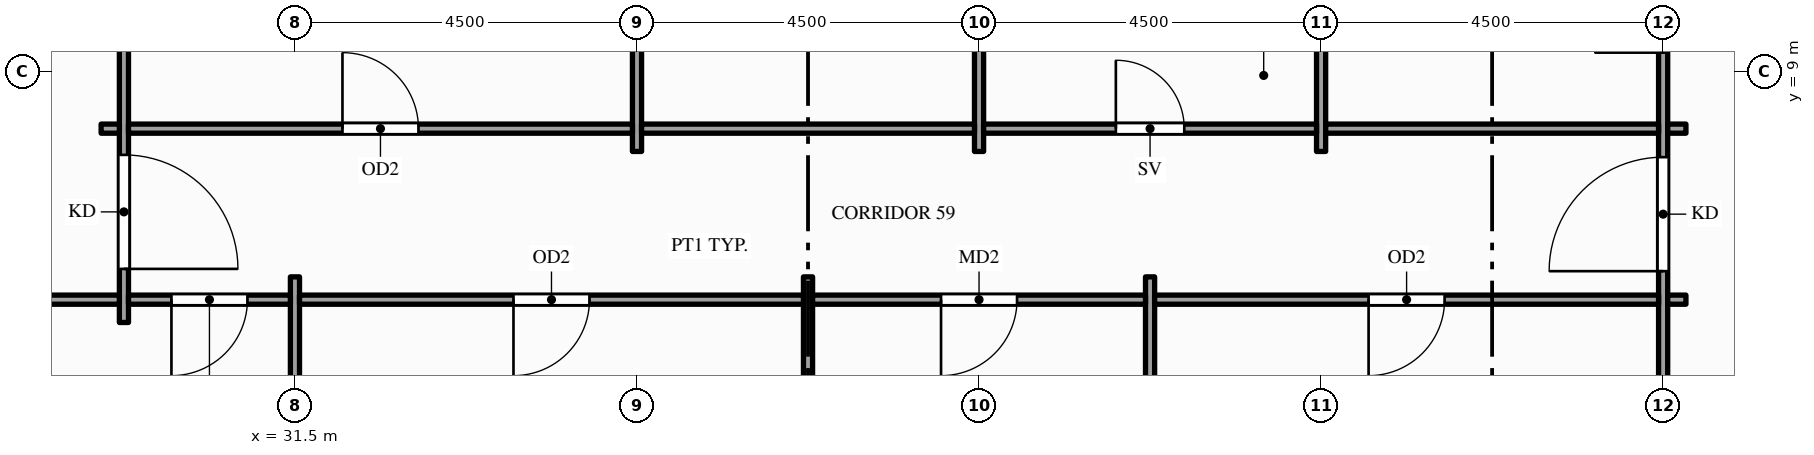
"""IFC4 building model, lengths in metres.
Left out: names, types, materials, properties, quantities, classifications, styles, units other than length and angle.
Written with IfcOpenShell. Run it as: python <this file> out.ifc"""

import sys

from ifc_helpers import new_model, si_unit, direction, frame, frame_2d, origin, place, context, subcontext, project, spatial, rectangle, extrude, element, fill, save


model = new_model("IFC4")
c1 = context("Model", 3, precision=1e-05, world=origin(), true_north=direction((0.0, 1.0)))
c2 = subcontext(c1, "Body", "Model", "MODEL_VIEW")
j1 = project(units=[si_unit("LENGTHUNIT", "METRE"), si_unit("PLANEANGLEUNIT", "RADIAN")], contexts=[c1])
p1 = place(None, origin())
s1 = spatial("IfcSite", under=j1, at=p1, CompositionType="ELEMENT")
p2 = place(p1, origin())
s2 = spatial("IfcBuilding", under=s1, at=p2, CompositionType="ELEMENT")
p3 = place(p2, frame((0.0, 0.0, 183.0)))
s3 = spatial("IfcBuildingStorey", under=s2, at=p3, CompositionType="ELEMENT", Elevation=183.0)
p4 = place(p3, frame((29.25, 5.7, 0.0), z_axis=(0.0, 0.0, 1.0), x_axis=(0.0, 1.0, 0.0)))
e1 = element("IfcWall", 1, at=p4, inside=s3, PredefinedType="PARTITIONING", context=c2, shape_type="SweptSolid", body=[
    extrude(rectangle(XDim=14.1, YDim=0.12, at=frame_2d((7.05, 0.0))), origin(), (0.0, 0.0, 1.0), 2.77),
])
p5 = place(p4, frame((0.705, 0.0, 0.0)))
e2 = element("IfcOpeningElement", 2, at=p5, cuts=e1, PredefinedType="OPENING", context=c2, shape_type="SweptSolid", body=[
    extrude(rectangle(XDim=1.5, YDim=2.1, at=frame_2d((0.75, 1.05))), frame((0.0, 0.07, 0.0), z_axis=(0.0, -1.0, 0.0), x_axis=(1.0, 0.0, 0.0)), (0.0, 0.0, 1.0), 0.14),
])
p6 = place(p4, frame((11.895, 0.0, 0.0)))
e3 = element("IfcOpeningElement", 3, at=p6, cuts=e1, PredefinedType="OPENING", context=c2, shape_type="SweptSolid", body=[
    extrude(rectangle(XDim=1.5, YDim=2.1, at=frame_2d((0.75, 1.05))), frame((0.0, 0.07, 0.0), z_axis=(0.0, -1.0, 0.0), x_axis=(1.0, 0.0, 0.0)), (0.0, 0.0, 1.0), 0.14),
])
p7 = place(p3, frame((31.5, 1.65, 0.0), z_axis=(0.0, 0.0, 1.0), x_axis=(0.0, 1.0, 0.0)))
e4 = element("IfcWall", 4, at=p7, inside=s3, PredefinedType="PARTITIONING", context=c2, shape_type="SweptSolid", body=[
    extrude(rectangle(XDim=4.65, YDim=0.12, at=frame_2d((2.325, 0.0))), origin(), (0.0, 0.0, 1.0), 2.77),
])
p8 = place(p3, frame((36.0, 7.95, 0.0), z_axis=(0.0, 0.0, 1.0), x_axis=(0.0, 1.0, 0.0)))
e5 = element("IfcWall", 5, at=p8, inside=s3, PredefinedType="PARTITIONING", context=c2, shape_type="SweptSolid", body=[
    extrude(rectangle(XDim=9.6, YDim=0.12, at=frame_2d((4.8, 0.0))), origin(), (0.0, 0.0, 1.0), 2.77),
])
p9 = place(p3, frame((38.25, 1.65, 0.0), z_axis=(0.0, 0.0, 1.0), x_axis=(0.0, 1.0, 0.0)))
e6 = element("IfcWall", 6, at=p9, inside=s3, PredefinedType="PARTITIONING", context=c2, shape_type="SweptSolid", body=[
    extrude(rectangle(XDim=4.65, YDim=0.12, at=frame_2d((2.325, 0.0))), origin(), (0.0, 0.0, 1.0), 2.77),
])
p10 = place(p3, frame((40.5, 7.95, 0.0), z_axis=(0.0, 0.0, 1.0), x_axis=(0.0, 1.0, 0.0)))
e7 = element("IfcWall", 7, at=p10, inside=s3, PredefinedType="PARTITIONING", context=c2, shape_type="SweptSolid", body=[
    extrude(rectangle(XDim=9.6, YDim=0.12, at=frame_2d((4.8, 0.0))), origin(), (0.0, 0.0, 1.0), 2.77),
])
p11 = place(p3, frame((42.75, 1.65, 0.0), z_axis=(0.0, 0.0, 1.0), x_axis=(0.0, 1.0, 0.0)))
e8 = element("IfcWall", 8, at=p11, inside=s3, PredefinedType="PARTITIONING", context=c2, shape_type="SweptSolid", body=[
    extrude(rectangle(XDim=4.65, YDim=0.12, at=frame_2d((2.325, 0.0))), origin(), (0.0, 0.0, 1.0), 2.77),
])
p12 = place(p3, frame((45.0, 7.95, 0.0), z_axis=(0.0, 0.0, 1.0), x_axis=(0.0, 1.0, 0.0)))
e9 = element("IfcWall", 9, at=p12, inside=s3, PredefinedType="PARTITIONING", context=c2, shape_type="SweptSolid", body=[
    extrude(rectangle(XDim=9.6, YDim=0.12, at=frame_2d((4.8, 0.0))), origin(), (0.0, 0.0, 1.0), 2.77),
])
p13 = place(p3, frame((49.5, 1.65, 0.0), z_axis=(0.0, 0.0, 1.0), x_axis=(0.0, 1.0, 0.0)))
e10 = element("IfcWall", 10, at=p13, inside=s3, PredefinedType="PARTITIONING", context=c2, shape_type="SweptSolid", body=[
    extrude(rectangle(XDim=22.2, YDim=0.12, at=frame_2d((11.1, 0.0))), origin(), (0.0, 0.0, 1.0), 2.35),
])
p14 = place(p13, frame((4.725, 0.0, 0.0)))
e11 = element("IfcOpeningElement", 11, at=p14, cuts=e10, PredefinedType="OPENING", context=c2, shape_type="SweptSolid", body=[
    extrude(rectangle(XDim=1.5, YDim=2.1, at=frame_2d((0.75, 1.05))), frame((0.0, 0.07, 0.0), z_axis=(0.0, -1.0, 0.0), x_axis=(1.0, 0.0, 0.0)), (0.0, 0.0, 1.0), 0.14),
])
p15 = place(p13, frame((15.975, 0.0, 0.0)))
e12 = element("IfcOpeningElement", 12, at=p15, cuts=e10, PredefinedType="OPENING", context=c2, shape_type="SweptSolid", body=[
    extrude(rectangle(XDim=1.5, YDim=2.1, at=frame_2d((0.75, 1.05))), frame((0.0, 0.07, 0.0), z_axis=(0.0, -1.0, 0.0), x_axis=(1.0, 0.0, 0.0)), (0.0, 0.0, 1.0), 0.14),
])
p16 = place(p13, frame((7.6, 0.0, 0.0)))
e13 = element("IfcOpeningElement", 13, at=p16, cuts=e10, PredefinedType="OPENING", context=c2, shape_type="SweptSolid", body=[
    extrude(rectangle(XDim=0.9, YDim=2.1, at=frame_2d((0.45, 1.05))), frame((0.0, 0.07, 0.0), z_axis=(0.0, -1.0, 0.0), x_axis=(1.0, 0.0, 0.0)), (0.0, 0.0, 1.0), 0.14),
])
p17 = place(p13, frame((10.65, 0.0, 0.0)))
e14 = element("IfcOpeningElement", 14, at=p17, cuts=e10, PredefinedType="OPENING", context=c2, shape_type="SweptSolid", body=[
    extrude(rectangle(XDim=0.9, YDim=2.1, at=frame_2d((0.45, 1.05))), frame((0.0, 0.07, 0.0), z_axis=(0.0, -1.0, 0.0), x_axis=(1.0, 0.0, 0.0)), (0.0, 0.0, 1.0), 0.14),
])
p18 = place(p13, frame((13.6, 0.0, 0.0)))
e15 = element("IfcOpeningElement", 15, at=p18, cuts=e10, PredefinedType="OPENING", context=c2, shape_type="SweptSolid", body=[
    extrude(rectangle(XDim=1.0, YDim=2.1, at=frame_2d((0.5, 1.05))), frame((0.0, 0.07, 0.0), z_axis=(0.0, -1.0, 0.0), x_axis=(1.0, 0.0, 0.0)), (0.0, 0.0, 1.0), 0.14),
])
p19 = place(p3, frame((27.06, 6.0, 0.0), z_axis=(0.0, 0.0, 1.0), x_axis=(1.0, 0.0, 0.0)))
e16 = element("IfcWall", 16, at=p19, inside=s3, PredefinedType="PARTITIONING", context=c2, shape_type="SweptSolid", body=[
    extrude(rectangle(XDim=2.13, YDim=0.12, at=frame_2d((1.065, 0.0))), origin(), (0.0, 0.0, 1.0), 2.77),
])
p20 = place(p3, frame((29.31, 6.0, 0.0), z_axis=(0.0, 0.0, 1.0), x_axis=(1.0, 0.0, 0.0)))
e17 = element("IfcWall", 17, at=p20, inside=s3, PredefinedType="PARTITIONING", context=c2, shape_type="SweptSolid", body=[
    extrude(rectangle(XDim=2.13, YDim=0.12, at=frame_2d((1.065, 0.0))), origin(), (0.0, 0.0, 1.0), 2.77),
])
p21 = place(p20, frame((0.565, 0.0, 0.0)))
e18 = element("IfcOpeningElement", 18, at=p21, cuts=e17, PredefinedType="OPENING", context=c2, shape_type="SweptSolid", body=[
    extrude(rectangle(XDim=1.0, YDim=2.1, at=frame_2d((0.5, 1.05))), frame((0.0, 0.07, 0.0), z_axis=(0.0, -1.0, 0.0), x_axis=(1.0, 0.0, 0.0)), (0.0, 0.0, 1.0), 0.14),
])
p22 = place(p3, frame((31.56, 6.0, 0.0), z_axis=(0.0, 0.0, 1.0), x_axis=(1.0, 0.0, 0.0)))
e19 = element("IfcWall", 19, at=p22, inside=s3, PredefinedType="PARTITIONING", context=c2, shape_type="SweptSolid", body=[
    extrude(rectangle(XDim=6.63, YDim=0.12, at=frame_2d((3.315, 0.0))), origin(), (0.0, 0.0, 1.0), 2.77),
])
p23 = place(p22, frame((2.815, 0.0, 0.0)))
e20 = element("IfcOpeningElement", 20, at=p23, cuts=e19, PredefinedType="OPENING", context=c2, shape_type="SweptSolid", body=[
    extrude(rectangle(XDim=1.0, YDim=2.1, at=frame_2d((0.5, 1.05))), frame((0.0, 0.07, 0.0), z_axis=(0.0, -1.0, 0.0), x_axis=(1.0, 0.0, 0.0)), (0.0, 0.0, 1.0), 0.14),
])
p24 = place(p3, frame((38.31, 6.0, 0.0), z_axis=(0.0, 0.0, 1.0), x_axis=(1.0, 0.0, 0.0)))
e21 = element("IfcWall", 21, at=p24, inside=s3, PredefinedType="PARTITIONING", context=c2, shape_type="SweptSolid", body=[
    extrude(rectangle(XDim=4.38, YDim=0.12, at=frame_2d((2.19, 0.0))), origin(), (0.0, 0.0, 1.0), 2.77),
])
p25 = place(p24, frame((1.69, 0.0, 0.0)))
e22 = element("IfcOpeningElement", 22, at=p25, cuts=e21, PredefinedType="OPENING", context=c2, shape_type="SweptSolid", body=[
    extrude(rectangle(XDim=1.0, YDim=2.1, at=frame_2d((0.5, 1.05))), frame((0.0, 0.07, 0.0), z_axis=(0.0, -1.0, 0.0), x_axis=(1.0, 0.0, 0.0)), (0.0, 0.0, 1.0), 0.14),
])
p26 = place(p3, frame((42.81, 6.0, 0.0), z_axis=(0.0, 0.0, 1.0), x_axis=(1.0, 0.0, 0.0)))
e23 = element("IfcWall", 23, at=p26, inside=s3, PredefinedType="PARTITIONING", context=c2, shape_type="SweptSolid", body=[
    extrude(rectangle(XDim=6.63, YDim=0.12, at=frame_2d((3.315, 0.0))), origin(), (0.0, 0.0, 1.0), 2.77),
])
p27 = place(p26, frame((2.815, 0.0, 0.0)))
e24 = element("IfcOpeningElement", 24, at=p27, cuts=e23, PredefinedType="OPENING", context=c2, shape_type="SweptSolid", body=[
    extrude(rectangle(XDim=1.0, YDim=2.1, at=frame_2d((0.5, 1.05))), frame((0.0, 0.07, 0.0), z_axis=(0.0, -1.0, 0.0), x_axis=(1.0, 0.0, 0.0)), (0.0, 0.0, 1.0), 0.14),
])
for number, where, z_axis, x_axis in (
    (25, (49.56, 6.0, 0.0), (0.0, 0.0, 1.0), (1.0, 0.0, 0.0)),
    (26, (28.95, 8.25, 0.0), (0.0, 0.0, 1.0), (1.0, 0.0, 0.0)),
):
    element("IfcWall", number, at=place(p3, frame(where, z_axis=z_axis, x_axis=x_axis)), inside=s3, PredefinedType="PARTITIONING", context=c2, shape_type="SweptSolid", body=[
        extrude(rectangle(XDim=0.24, YDim=0.12, at=frame_2d((0.12, 0.0))), origin(), (0.0, 0.0, 1.0), 2.77),
    ])
p28 = place(p3, frame((29.31, 8.25, 0.0), z_axis=(0.0, 0.0, 1.0), x_axis=(1.0, 0.0, 0.0)))
e27 = element("IfcWall", 27, at=p28, inside=s3, PredefinedType="PARTITIONING", context=c2, shape_type="SweptSolid", body=[
    extrude(rectangle(XDim=6.63, YDim=0.12, at=frame_2d((3.315, 0.0))), origin(), (0.0, 0.0, 1.0), 2.77),
])
p29 = place(p28, frame((2.815, 0.0, 0.0)))
e28 = element("IfcOpeningElement", 28, at=p29, cuts=e27, PredefinedType="OPENING", context=c2, shape_type="SweptSolid", body=[
    extrude(rectangle(XDim=1.0, YDim=2.1, at=frame_2d((0.5, 1.05))), frame((0.0, 0.07, 0.0), z_axis=(0.0, -1.0, 0.0), x_axis=(1.0, 0.0, 0.0)), (0.0, 0.0, 1.0), 0.14),
])
p30 = place(p3, frame((36.06, 8.25, 0.0), z_axis=(0.0, 0.0, 1.0), x_axis=(1.0, 0.0, 0.0)))
e29 = element("IfcWall", 29, at=p30, inside=s3, PredefinedType="PARTITIONING", context=c2, shape_type="SweptSolid", body=[
    extrude(rectangle(XDim=4.38, YDim=0.12, at=frame_2d((2.19, 0.0))), origin(), (0.0, 0.0, 1.0), 2.77),
])
p31 = place(p3, frame((40.56, 8.25, 0.0), z_axis=(0.0, 0.0, 1.0), x_axis=(1.0, 0.0, 0.0)))
e30 = element("IfcWall", 30, at=p31, inside=s3, PredefinedType="PARTITIONING", context=c2, shape_type="SweptSolid", body=[
    extrude(rectangle(XDim=4.38, YDim=0.12, at=frame_2d((2.19, 0.0))), origin(), (0.0, 0.0, 1.0), 2.77),
])
p32 = place(p31, frame((1.74, 0.0, 0.0)))
e31 = element("IfcOpeningElement", 31, at=p32, cuts=e30, PredefinedType="OPENING", context=c2, shape_type="SweptSolid", body=[
    extrude(rectangle(XDim=0.9, YDim=2.1, at=frame_2d((0.45, 1.05))), frame((0.0, 0.07, 0.0), z_axis=(0.0, -1.0, 0.0), x_axis=(1.0, 0.0, 0.0)), (0.0, 0.0, 1.0), 0.14),
])
p33 = place(p3, frame((45.06, 8.25, 0.0), z_axis=(0.0, 0.0, 1.0), x_axis=(1.0, 0.0, 0.0)))
e32 = element("IfcWall", 32, at=p33, inside=s3, PredefinedType="PARTITIONING", context=c2, shape_type="SweptSolid", body=[
    extrude(rectangle(XDim=4.38, YDim=0.12, at=frame_2d((2.19, 0.0))), origin(), (0.0, 0.0, 1.0), 2.77),
])
p34 = place(p3, frame((49.56, 8.25, 0.0), z_axis=(0.0, 0.0, 1.0), x_axis=(1.0, 0.0, 0.0)))
e33 = element("IfcWall", 33, at=p34, inside=s3, PredefinedType="PARTITIONING", context=c2, shape_type="SweptSolid", body=[
    extrude(rectangle(XDim=0.24, YDim=0.12, at=frame_2d((0.12, 0.0))), origin(), (0.0, 0.0, 1.0), 2.77),
])
p35 = place(p5, origin())
e34 = element("IfcDoor", 34, at=p35, inside=s3, OperationType="SINGLE_SWING_LEFT", PredefinedType="DOOR", context=c2, shape_type="SweptSolid", body=[
    extrude(rectangle(XDim=1.5, YDim=2.1, at=frame_2d((0.75, 1.05))), frame((0.0, 0.025, 0.0), z_axis=(0.0, -1.0, 0.0), x_axis=(1.0, 0.0, 0.0)), (0.0, 0.0, 1.0), 0.05),
])
fill(e2, e34)
p36 = place(p14, origin())
e35 = element("IfcDoor", 35, at=p36, inside=s3, OperationType="SINGLE_SWING_LEFT", PredefinedType="DOOR", context=c2, shape_type="SweptSolid", body=[
    extrude(rectangle(XDim=1.5, YDim=2.1, at=frame_2d((0.75, 1.05))), frame((0.0, 0.025, 0.0), z_axis=(0.0, -1.0, 0.0), x_axis=(1.0, 0.0, 0.0)), (0.0, 0.0, 1.0), 0.05),
])
fill(e11, e35)
p37 = place(p29, origin())
e36 = element("IfcDoor", 36, at=p37, inside=s3, OperationType="SINGLE_SWING_LEFT", PredefinedType="DOOR", context=c2, shape_type="SweptSolid", body=[
    extrude(rectangle(XDim=1.0, YDim=2.1, at=frame_2d((0.5, 1.05))), frame((0.0, 0.025, 0.0), z_axis=(0.0, -1.0, 0.0), x_axis=(1.0, 0.0, 0.0)), (0.0, 0.0, 1.0), 0.05),
])
fill(e28, e36)
p38 = place(p32, origin())
e37 = element("IfcDoor", 37, at=p38, inside=s3, OperationType="SINGLE_SWING_LEFT", PredefinedType="DOOR", context=c2, shape_type="SweptSolid", body=[
    extrude(rectangle(XDim=0.9, YDim=2.1, at=frame_2d((0.45, 1.05))), frame((0.0, 0.025, 0.0), z_axis=(0.0, -1.0, 0.0), x_axis=(1.0, 0.0, 0.0)), (0.0, 0.0, 1.0), 0.05),
])
fill(e31, e37)
p39 = place(p21, origin())
e38 = element("IfcDoor", 38, at=p39, inside=s3, OperationType="SINGLE_SWING_LEFT", PredefinedType="DOOR", context=c2, shape_type="SweptSolid", body=[
    extrude(rectangle(XDim=1.0, YDim=2.1, at=frame_2d((0.5, 1.05))), frame((0.0, 0.025, 0.0), z_axis=(0.0, -1.0, 0.0), x_axis=(1.0, 0.0, 0.0)), (0.0, 0.0, 1.0), 0.05),
])
fill(e18, e38)
p40 = place(p23, origin())
e39 = element("IfcDoor", 39, at=p40, inside=s3, OperationType="SINGLE_SWING_LEFT", PredefinedType="DOOR", context=c2, shape_type="SweptSolid", body=[
    extrude(rectangle(XDim=1.0, YDim=2.1, at=frame_2d((0.5, 1.05))), frame((0.0, 0.025, 0.0), z_axis=(0.0, -1.0, 0.0), x_axis=(1.0, 0.0, 0.0)), (0.0, 0.0, 1.0), 0.05),
])
fill(e20, e39)
p41 = place(p25, origin())
e40 = element("IfcDoor", 40, at=p41, inside=s3, OperationType="SINGLE_SWING_LEFT", PredefinedType="DOOR", context=c2, shape_type="SweptSolid", body=[
    extrude(rectangle(XDim=1.0, YDim=2.1, at=frame_2d((0.5, 1.05))), frame((0.0, 0.025, 0.0), z_axis=(0.0, -1.0, 0.0), x_axis=(1.0, 0.0, 0.0)), (0.0, 0.0, 1.0), 0.05),
])
fill(e22, e40)
p42 = place(p27, origin())
e41 = element("IfcDoor", 41, at=p42, inside=s3, OperationType="SINGLE_SWING_LEFT", PredefinedType="DOOR", context=c2, shape_type="SweptSolid", body=[
    extrude(rectangle(XDim=1.0, YDim=2.1, at=frame_2d((0.5, 1.05))), frame((0.0, 0.025, 0.0), z_axis=(0.0, -1.0, 0.0), x_axis=(1.0, 0.0, 0.0)), (0.0, 0.0, 1.0), 0.05),
])
fill(e24, e41)
save(model, sys.argv[1])
